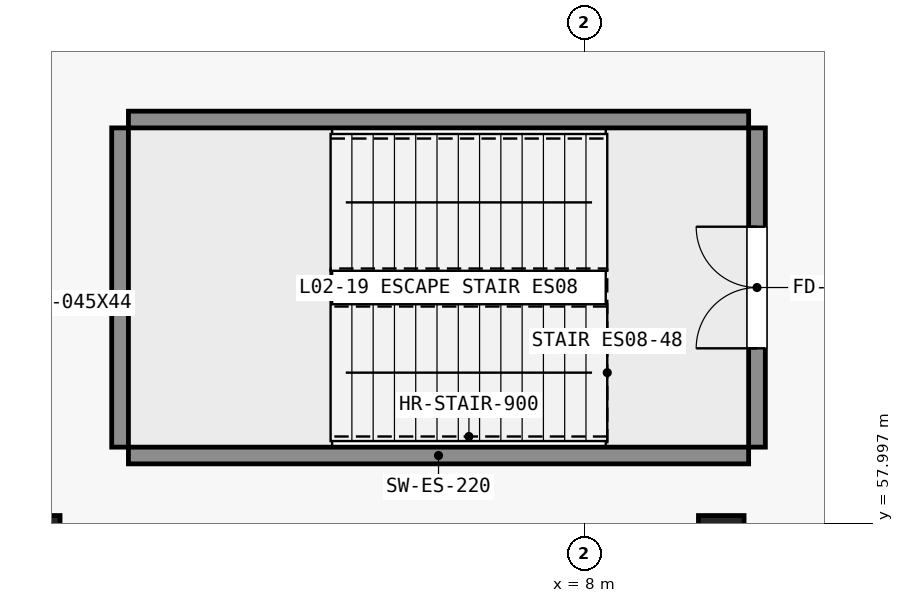
"""IFC4 building model, lengths in metres.
Left out: names, types, materials, properties, quantities, classifications, styles, units other than length and angle.
Written with IfcOpenShell. Run it as: python <this file> out.ifc"""

import sys

from ifc_helpers import new_model, si_unit, direction, frame, frame_2d, origin, origin_2d, place, context, subcontext, project, spatial, rectangle, extrude, element, fill, save


model = new_model("IFC4")
c1 = context("Model", 3, precision=1e-05, world=origin(), true_north=direction((0.0, 1.0)))
c2 = subcontext(c1, "Body", "Model", "MODEL_VIEW")
j1 = project(units=[si_unit("LENGTHUNIT", "METRE"), si_unit("PLANEANGLEUNIT", "RADIAN")], contexts=[c1])
p1 = place(None, origin())
s1 = spatial("IfcSite", under=j1, at=p1, CompositionType="ELEMENT")
p2 = place(p1, origin())
s2 = spatial("IfcBuilding", under=s1, at=p2, CompositionType="ELEMENT")
p3 = place(p2, frame((0.0, 0.0, 11.4)))
s3 = spatial("IfcBuildingStorey", under=s2, at=p3, CompositionType="ELEMENT", Elevation=11.4)
for number, where, z_axis, x_axis in (
    (1, (0.8, 57.8, 0.0), (0.0, 0.0, 1.0), (1.0, 0.0, 0.0)),
    (2, (9.8, 57.8, 0.0), (0.0, 0.0, 1.0), (1.0, 0.0, 0.0)),
):
    element("IfcColumn", number, at=place(p3, frame(where, z_axis=z_axis, x_axis=x_axis)), inside=s3, PredefinedType="COLUMN", context=c2, shape_type="SweptSolid", body=[
        extrude(rectangle(XDim=0.6, YDim=0.6, at=origin_2d()), origin(), (0.0, 0.0, 1.0), 4.8),
    ])
for number, where, z_axis, x_axis in (
    (3, (2.0, 58.89, 0.0), (0.0, 0.0, 1.0), (1.0, 0.0, 0.0)),
    (4, (2.0, 63.31, 0.0), (0.0, 0.0, 1.0), (1.0, 0.0, 0.0)),
):
    element("IfcWall", number, at=place(p3, frame(where, z_axis=z_axis, x_axis=x_axis)), inside=s3, PredefinedType="SHEAR", context=c2, shape_type="SweptSolid", body=[
        extrude(rectangle(XDim=8.16, YDim=0.22, at=frame_2d((4.08, 0.0))), origin(), (0.0, 0.0, 1.0), 4.8),
    ])
p4 = place(p3, frame((1.89, 59.0, 0.0), z_axis=(0.0, 0.0, 1.0), x_axis=(0.0, 1.0, 0.0)))
e5 = element("IfcWall", 5, at=p4, inside=s3, PredefinedType="SHEAR", context=c2, shape_type="SweptSolid", body=[
    extrude(rectangle(XDim=4.2, YDim=0.22, at=frame_2d((2.1, 0.0))), origin(), (0.0, 0.0, 1.0), 4.8),
])
p5 = place(p3, frame((10.27, 59.0, 0.0), z_axis=(0.0, 0.0, 1.0), x_axis=(0.0, 1.0, 0.0)))
e6 = element("IfcWall", 6, at=p5, inside=s3, PredefinedType="SHEAR", context=c2, shape_type="SweptSolid", body=[
    extrude(rectangle(XDim=4.2, YDim=0.22, at=frame_2d((2.1, 0.0))), origin(), (0.0, 0.0, 1.0), 4.8),
])
p6 = place(p5, frame((1.3, 0.0, 0.0)))
e7 = element("IfcOpeningElement", 7, at=p6, cuts=e6, PredefinedType="OPENING", context=c2, shape_type="SweptSolid", body=[
    extrude(rectangle(XDim=1.6, YDim=2.2, at=frame_2d((0.8, 1.1))), frame((0.0, 0.12, 0.0), z_axis=(0.0, -1.0, 0.0), x_axis=(1.0, 0.0, 0.0)), (0.0, 0.0, 1.0), 0.24),
])
p7 = place(p6, origin())
e8 = element("IfcDoor", 8, at=p7, inside=s3, OperationType="DOUBLE_DOOR_SINGLE_SWING", PredefinedType="DOOR", context=c2, shape_type="SweptSolid", body=[
    extrude(rectangle(XDim=1.6, YDim=2.2, at=frame_2d((0.8, 1.1))), frame((0.0, 0.025, 0.0), z_axis=(0.0, -1.0, 0.0), x_axis=(1.0, 0.0, 0.0)), (0.0, 0.0, 1.0), 0.05),
])
fill(e7, e8)
save(model, sys.argv[1])
